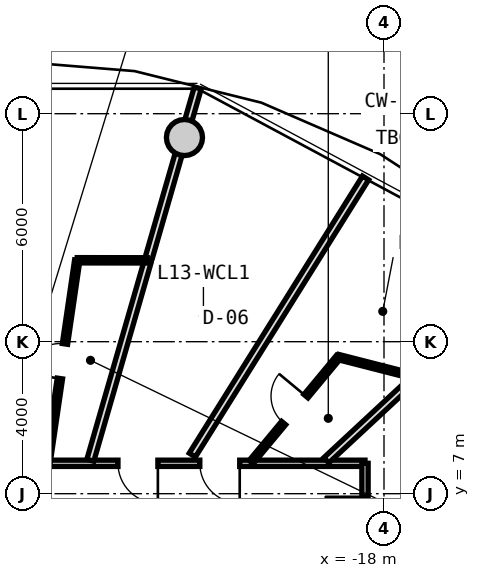
"""IFC4 building model, lengths in metres.
Left out: names, types, materials, properties, quantities, classifications, styles, units other than length and angle.
Written with IfcOpenShell. Run it as: python <this file> out.ifc"""

import sys

from ifc_helpers import new_model, si_unit, direction, frame, frame_2d, origin, origin_2d, place, context, subcontext, project, spatial, rectangle, circle, extrude, source, transform, mapped, element, fill, save


model = new_model("IFC4")
c1 = context("Model", 3, precision=1e-05, world=origin(), true_north=direction((0.0, 1.0)))
c2 = subcontext(c1, "Body", "Model", "MODEL_VIEW")
j1 = project(units=[si_unit("LENGTHUNIT", "METRE"), si_unit("PLANEANGLEUNIT", "RADIAN")], contexts=[c1])
p1 = place(None, origin())
s1 = spatial("IfcSite", under=j1, at=p1, CompositionType="ELEMENT")
p2 = place(p1, origin())
s2 = spatial("IfcBuilding", under=s1, at=p2, CompositionType="ELEMENT")
p3 = place(p2, frame((0.0, 0.0, 46.0)))
s3 = spatial("IfcBuildingStorey", under=s2, at=p3, CompositionType="ELEMENT", Elevation=46.0)
m1 = source(origin(), c2, "Body", "SweptSolid", [
    extrude(circle(Radius=0.475, at=origin_2d()), origin(), (0.0, 0.0, 1.0), 3.05),
])
p4 = place(p3, frame((-23.251, 16.373, 0.0), z_axis=(0.0, 0.0, 1.0), x_axis=(1.0, 0.0, 0.0)))
e1 = element("IfcColumn", 1, at=p4, inside=s3, PredefinedType="COLUMN", context=c2, shape_type="MappedRepresentation", body=[
    mapped(m1, transform((0.0, 0.0, 0.0), x_axis=(1.0, 0.0, 0.0), y_axis=(0.0, 1.0, 0.0), z_axis=(0.0, 0.0, 1.0), scale=1.0)),
])
m2 = source(origin(), c2, "Body", "SweptSolid", [
    extrude(rectangle(XDim=19.0, YDim=0.165, at=frame_2d((9.5, 0.0))), origin(), (0.0, 0.0, 1.0), 2.775),
])
p5 = place(p3, frame((-37.5, 7.8, 0.0), z_axis=(0.0, 0.0, 1.0), x_axis=(1.0, 0.0, 0.0)))
e2 = element("IfcWall", 2, at=p5, inside=s3, PredefinedType="PARTITIONING", context=c2, shape_type="MappedRepresentation", body=[
    mapped(m2, transform((0.0, 0.0, 0.0), x_axis=(1.0, 0.0, 0.0), y_axis=(0.0, 1.0, 0.0), z_axis=(0.0, 0.0, 1.0), scale=1.0)),
])
p6 = place(p5, frame((4.773, 0.0, 0.0)))
e3 = element("IfcOpeningElement", 3, at=p6, cuts=e2, PredefinedType="OPENING", context=c2, shape_type="SweptSolid", body=[
    extrude(rectangle(XDim=1.05, YDim=2.15, at=frame_2d((0.525, 1.075))), frame((0.0, 0.093, 0.0), z_axis=(0.0, -1.0, 0.0), x_axis=(1.0, 0.0, 0.0)), (0.0, 0.0, 1.0), 0.185),
])
p7 = place(p5, frame((2.251, 0.0, 0.0)))
e4 = element("IfcOpeningElement", 4, at=p7, cuts=e2, PredefinedType="OPENING", context=c2, shape_type="SweptSolid", body=[
    extrude(rectangle(XDim=1.05, YDim=2.15, at=frame_2d((0.525, 1.075))), frame((0.0, 0.093, 0.0), z_axis=(0.0, -1.0, 0.0), x_axis=(1.0, 0.0, 0.0)), (0.0, 0.0, 1.0), 0.185),
])
p8 = place(p5, frame((14.653, 0.0, 0.0)))
e5 = element("IfcOpeningElement", 5, at=p8, cuts=e2, PredefinedType="OPENING", context=c2, shape_type="SweptSolid", body=[
    extrude(rectangle(XDim=1.05, YDim=2.15, at=frame_2d((0.525, 1.075))), frame((0.0, 0.093, 0.0), z_axis=(0.0, -1.0, 0.0), x_axis=(1.0, 0.0, 0.0)), (0.0, 0.0, 1.0), 0.185),
])
p9 = place(p5, frame((12.5, 0.0, 0.0)))
e6 = element("IfcOpeningElement", 6, at=p9, cuts=e2, PredefinedType="OPENING", context=c2, shape_type="SweptSolid", body=[
    extrude(rectangle(XDim=1.05, YDim=2.15, at=frame_2d((0.525, 1.075))), frame((0.0, 0.093, 0.0), z_axis=(0.0, -1.0, 0.0), x_axis=(1.0, 0.0, 0.0)), (0.0, 0.0, 1.0), 0.185),
])
p10 = place(p5, frame((9.352, 0.0, 0.0)))
e7 = element("IfcOpeningElement", 7, at=p10, cuts=e2, PredefinedType="OPENING", context=c2, shape_type="SweptSolid", body=[
    extrude(rectangle(XDim=1.05, YDim=2.15, at=frame_2d((0.525, 1.075))), frame((0.0, 0.093, 0.0), z_axis=(0.0, -1.0, 0.0), x_axis=(1.0, 0.0, 0.0)), (0.0, 0.0, 1.0), 0.185),
])
p11 = place(p5, frame((7.806, 0.0, 0.0)))
e8 = element("IfcOpeningElement", 8, at=p11, cuts=e2, PredefinedType="OPENING", context=c2, shape_type="SweptSolid", body=[
    extrude(rectangle(XDim=1.05, YDim=2.15, at=frame_2d((0.525, 1.075))), frame((0.0, 0.093, 0.0), z_axis=(0.0, -1.0, 0.0), x_axis=(1.0, 0.0, 0.0)), (0.0, 0.0, 1.0), 0.185),
])
m3 = source(origin(), c2, "Body", "SweptSolid", [
    extrude(rectangle(XDim=15.6, YDim=0.165, at=frame_2d((7.8, 0.0))), origin(), (0.0, 0.0, 1.0), 2.775),
])
p12 = place(p3, frame((-18.5, 7.8, 0.0), z_axis=(0.0, 0.0, 1.0), x_axis=(0.0, -1.0, 0.0)))
e9 = element("IfcWall", 9, at=p12, inside=s3, PredefinedType="PARTITIONING", context=c2, shape_type="MappedRepresentation", body=[
    mapped(m3, transform((0.0, 0.0, 0.0), x_axis=(1.0, 0.0, 0.0), y_axis=(0.0, 1.0, 0.0), z_axis=(0.0, 0.0, 1.0), scale=1.0)),
])
p13 = place(p12, frame((12.141, 0.0, 0.0)))
e10 = element("IfcOpeningElement", 10, at=p13, cuts=e9, PredefinedType="OPENING", context=c2, shape_type="SweptSolid", body=[
    extrude(rectangle(XDim=1.25, YDim=2.2, at=frame_2d((0.625, 1.1))), frame((0.0, 0.093, 0.0), z_axis=(0.0, -1.0, 0.0), x_axis=(1.0, 0.0, 0.0)), (0.0, 0.0, 1.0), 0.185),
])
p14 = place(p12, frame((7.175, 0.0, 0.0)))
e11 = element("IfcOpeningElement", 11, at=p14, cuts=e9, PredefinedType="OPENING", context=c2, shape_type="SweptSolid", body=[
    extrude(rectangle(XDim=1.25, YDim=2.2, at=frame_2d((0.625, 1.1))), frame((0.0, 0.093, 0.0), z_axis=(0.0, -1.0, 0.0), x_axis=(1.0, 0.0, 0.0)), (0.0, 0.0, 1.0), 0.185),
])
p15 = place(p12, frame((2.826, 0.0, 0.0)))
e12 = element("IfcOpeningElement", 12, at=p15, cuts=e9, PredefinedType="OPENING", context=c2, shape_type="SweptSolid", body=[
    extrude(rectangle(XDim=1.05, YDim=2.15, at=frame_2d((0.525, 1.075))), frame((0.0, 0.093, 0.0), z_axis=(0.0, -1.0, 0.0), x_axis=(1.0, 0.0, 0.0)), (0.0, 0.0, 1.0), 0.185),
])
p16 = place(p12, frame((0.881, 0.0, 0.0)))
e13 = element("IfcOpeningElement", 13, at=p16, cuts=e9, PredefinedType="OPENING", context=c2, shape_type="SweptSolid", body=[
    extrude(rectangle(XDim=1.05, YDim=2.15, at=frame_2d((0.525, 1.075))), frame((0.0, 0.093, 0.0), z_axis=(0.0, -1.0, 0.0), x_axis=(1.0, 0.0, 0.0)), (0.0, 0.0, 1.0), 0.185),
])
m4 = source(origin(), c2, "Body", "SweptSolid", [
    extrude(rectangle(XDim=7.435, YDim=0.19, at=frame_2d((3.717, 0.0))), origin(), (0.0, 0.0, 1.0), 2.225),
])
p17 = place(p3, frame((-19.517, 7.88, 0.0), z_axis=(0.0, 0.0, 1.0), x_axis=(0.732651956848, 0.680603489652, 0.0)))
e14 = element("IfcWall", 14, at=p17, inside=s3, PredefinedType="PARTITIONING", context=c2, shape_type="MappedRepresentation", body=[
    mapped(m4, transform((0.0, 0.0, 0.0), x_axis=(1.0, 0.0, 0.0), y_axis=(0.0, 1.0, 0.0), z_axis=(0.0, 0.0, 1.0), scale=1.0)),
])
m5 = source(origin(), c2, "Body", "SweptSolid", [
    extrude(rectangle(XDim=7.677, YDim=0.19, at=frame_2d((3.838, 0.0))), origin(), (0.0, 0.0, 1.0), 2.775),
])
p18 = place(p3, frame((-18.297, 5.231, 0.0), z_axis=(0.0, 0.0, 1.0), x_axis=(0.882725057546, 0.469889851753, 0.0)))
e15 = element("IfcWall", 15, at=p18, inside=s3, PredefinedType="PARTITIONING", context=c2, shape_type="MappedRepresentation", body=[
    mapped(m5, transform((0.0, 0.0, 0.0), x_axis=(1.0, 0.0, 0.0), y_axis=(0.0, 1.0, 0.0), z_axis=(0.0, 0.0, 1.0), scale=1.0)),
])
m6 = source(origin(), c2, "Body", "SweptSolid", [
    extrude(rectangle(XDim=10.196, YDim=0.19, at=frame_2d((5.098, 0.0))), origin(), (0.0, 0.0, 1.0), 2.225),
])
p19 = place(p3, frame((-25.727, 7.88, 0.0), z_axis=(0.0, 0.0, 1.0), x_axis=(0.277136420347, 0.960830580549, 0.0)))
e16 = element("IfcWall", 16, at=p19, inside=s3, PredefinedType="PARTITIONING", context=c2, shape_type="MappedRepresentation", body=[
    mapped(m6, transform((0.0, 0.0, 0.0), x_axis=(1.0, 0.0, 0.0), y_axis=(0.0, 1.0, 0.0), z_axis=(0.0, 0.0, 1.0), scale=1.0)),
])
m7 = source(origin(), c2, "Body", "SweptSolid", [
    extrude(rectangle(XDim=8.598, YDim=0.19, at=frame_2d((4.299, 0.0))), origin(), (0.0, 0.0, 1.0), 2.775),
])
p20 = place(p3, frame((-23.043, 8.017, 0.0), z_axis=(0.0, 0.0, 1.0), x_axis=(0.530039776395, 0.847972779893, 0.0)))
e17 = element("IfcWall", 17, at=p20, inside=s3, PredefinedType="PARTITIONING", context=c2, shape_type="MappedRepresentation", body=[
    mapped(m7, transform((0.0, 0.0, 0.0), x_axis=(1.0, 0.0, 0.0), y_axis=(0.0, 1.0, 0.0), z_axis=(0.0, 0.0, 1.0), scale=1.0)),
])
m8 = source(origin(), c2, "Body", "SweptSolid", [
    extrude(rectangle(XDim=3.594, YDim=0.14, at=frame_2d((1.797, 0.0))), origin(), (0.0, 0.0, 1.0), 2.775),
])
p21 = place(p3, frame((-21.496, 7.83, 0.0), z_axis=(0.0, 0.0, 1.0), x_axis=(0.639001147083, 0.769205781326, 0.0)))
e18 = element("IfcWall", 18, at=p21, inside=s3, PredefinedType="PARTITIONING", context=c2, shape_type="MappedRepresentation", body=[
    mapped(m8, transform((0.0, 0.0, 0.0), x_axis=(1.0, 0.0, 0.0), y_axis=(0.0, 1.0, 0.0), z_axis=(0.0, 0.0, 1.0), scale=1.0)),
])
p22 = place(p21, frame((1.337, 0.0, 0.0)))
e19 = element("IfcOpeningElement", 19, at=p22, cuts=e18, PredefinedType="OPENING", context=c2, shape_type="SweptSolid", body=[
    extrude(rectangle(XDim=0.92, YDim=2.1, at=frame_2d((0.46, 1.05))), frame((0.0, 0.08, 0.0), z_axis=(0.0, -1.0, 0.0), x_axis=(1.0, 0.0, 0.0)), (0.0, 0.0, 1.0), 0.16),
])
m9 = source(origin(), c2, "Body", "SweptSolid", [
    extrude(rectangle(XDim=2.062, YDim=0.14, at=frame_2d((1.031, 0.0))), origin(), (0.0, 0.0, 1.0), 2.415),
])
p23 = place(p3, frame((-19.199, 10.595, 0.0), z_axis=(0.0, 0.0, 1.0), x_axis=(0.968776253543, -0.247936626121, 0.0)))
e20 = element("IfcWall", 20, at=p23, inside=s3, PredefinedType="PARTITIONING", context=c2, shape_type="MappedRepresentation", body=[
    mapped(m9, transform((0.0, 0.0, 0.0), x_axis=(1.0, 0.0, 0.0), y_axis=(0.0, 1.0, 0.0), z_axis=(0.0, 0.0, 1.0), scale=1.0)),
])
m10 = source(origin(), c2, "Body", "SweptSolid", [
    extrude(rectangle(XDim=5.37, YDim=0.14, at=frame_2d((2.685, 0.0))), origin(), (0.0, 0.0, 1.0), 2.775),
])
p24 = place(p3, frame((-26.851, 7.83, 0.0), z_axis=(0.0, 0.0, 1.0), x_axis=(0.145131397853, 0.989412389935, 0.0)))
e21 = element("IfcWall", 21, at=p24, inside=s3, PredefinedType="PARTITIONING", context=c2, shape_type="MappedRepresentation", body=[
    mapped(m10, transform((0.0, 0.0, 0.0), x_axis=(1.0, 0.0, 0.0), y_axis=(0.0, 1.0, 0.0), z_axis=(0.0, 0.0, 1.0), scale=1.0)),
])
p25 = place(p24, frame((2.225, 0.0, 0.0)))
e22 = element("IfcOpeningElement", 22, at=p25, cuts=e21, PredefinedType="OPENING", context=c2, shape_type="SweptSolid", body=[
    extrude(rectangle(XDim=0.92, YDim=2.1, at=frame_2d((0.46, 1.05))), frame((0.0, 0.08, 0.0), z_axis=(0.0, -1.0, 0.0), x_axis=(1.0, 0.0, 0.0)), (0.0, 0.0, 1.0), 0.16),
])
m11 = source(origin(), c2, "Body", "SweptSolid", [
    extrude(rectangle(XDim=1.843, YDim=0.14, at=frame_2d((0.921, 0.0))), origin(), (0.0, 0.0, 1.0), 2.775),
])
p26 = place(p3, frame((-26.072, 13.143, 0.0), z_axis=(0.0, 0.0, 1.0), x_axis=(0.999998937801, -0.001457531246, 0.0)))
e23 = element("IfcWall", 23, at=p26, inside=s3, PredefinedType="PARTITIONING", context=c2, shape_type="MappedRepresentation", body=[
    mapped(m11, transform((0.0, 0.0, 0.0), x_axis=(1.0, 0.0, 0.0), y_axis=(0.0, 1.0, 0.0), z_axis=(0.0, 0.0, 1.0), scale=1.0)),
])
m12 = source(origin(), c2, "Body", "SweptSolid", [
    extrude(rectangle(XDim=1.05, YDim=2.15, at=frame_2d((0.525, 1.075))), frame((0.0, 0.025, 0.0), z_axis=(0.0, -1.0, 0.0), x_axis=(1.0, 0.0, 0.0)), (0.0, 0.0, 1.0), 0.05),
])
p27 = place(p16, frame((1.05, 0.0, 0.0), z_axis=(0.0, 0.0, 1.0), x_axis=(-1.0, 0.0, 0.0)))
e24 = element("IfcDoor", 24, at=p27, inside=s3, OperationType="SINGLE_SWING_RIGHT", PredefinedType="DOOR", context=c2, shape_type="MappedRepresentation", body=[
    mapped(m12, transform((0.0, 0.0, 0.0), x_axis=(1.0, 0.0, 0.0), y_axis=(0.0, 1.0, 0.0), z_axis=(0.0, 0.0, 1.0), scale=1.0)),
])
fill(e13, e24)
p28 = place(p8, frame((1.05, 0.0, 0.0), z_axis=(0.0, 0.0, 1.0), x_axis=(-1.0, 0.0, 0.0)))
e25 = element("IfcDoor", 25, at=p28, inside=s3, OperationType="SINGLE_SWING_LEFT", PredefinedType="DOOR", context=c2, shape_type="MappedRepresentation", body=[
    mapped(m12, transform((0.0, 0.0, 0.0), x_axis=(1.0, 0.0, 0.0), y_axis=(0.0, 1.0, 0.0), z_axis=(0.0, 0.0, 1.0), scale=1.0)),
])
fill(e5, e25)
m13 = source(origin(), c2, "Body", "SweptSolid", [
    extrude(rectangle(XDim=0.92, YDim=2.1, at=frame_2d((0.46, 1.05))), frame((0.0, 0.025, 0.0), z_axis=(0.0, -1.0, 0.0), x_axis=(1.0, 0.0, 0.0)), (0.0, 0.0, 1.0), 0.05),
])
p29 = place(p22, origin())
e26 = element("IfcDoor", 26, at=p29, inside=s3, OperationType="SINGLE_SWING_RIGHT", PredefinedType="DOOR", context=c2, shape_type="MappedRepresentation", body=[
    mapped(m13, transform((0.0, 0.0, 0.0), x_axis=(1.0, 0.0, 0.0), y_axis=(0.0, 1.0, 0.0), z_axis=(0.0, 0.0, 1.0), scale=1.0)),
])
fill(e19, e26)
p30 = place(p9, frame((1.05, 0.0, 0.0), z_axis=(0.0, 0.0, 1.0), x_axis=(-1.0, 0.0, 0.0)))
e27 = element("IfcDoor", 27, at=p30, inside=s3, OperationType="SINGLE_SWING_LEFT", PredefinedType="DOOR", context=c2, shape_type="MappedRepresentation", body=[
    mapped(m12, transform((0.0, 0.0, 0.0), x_axis=(1.0, 0.0, 0.0), y_axis=(0.0, 1.0, 0.0), z_axis=(0.0, 0.0, 1.0), scale=1.0)),
])
fill(e6, e27)
p31 = place(p25, origin())
e28 = element("IfcDoor", 28, at=p31, inside=s3, OperationType="SINGLE_SWING_LEFT", PredefinedType="DOOR", context=c2, shape_type="MappedRepresentation", body=[
    mapped(m13, transform((0.0, 0.0, 0.0), x_axis=(1.0, 0.0, 0.0), y_axis=(0.0, 1.0, 0.0), z_axis=(0.0, 0.0, 1.0), scale=1.0)),
])
fill(e22, e28)
save(model, sys.argv[1])
